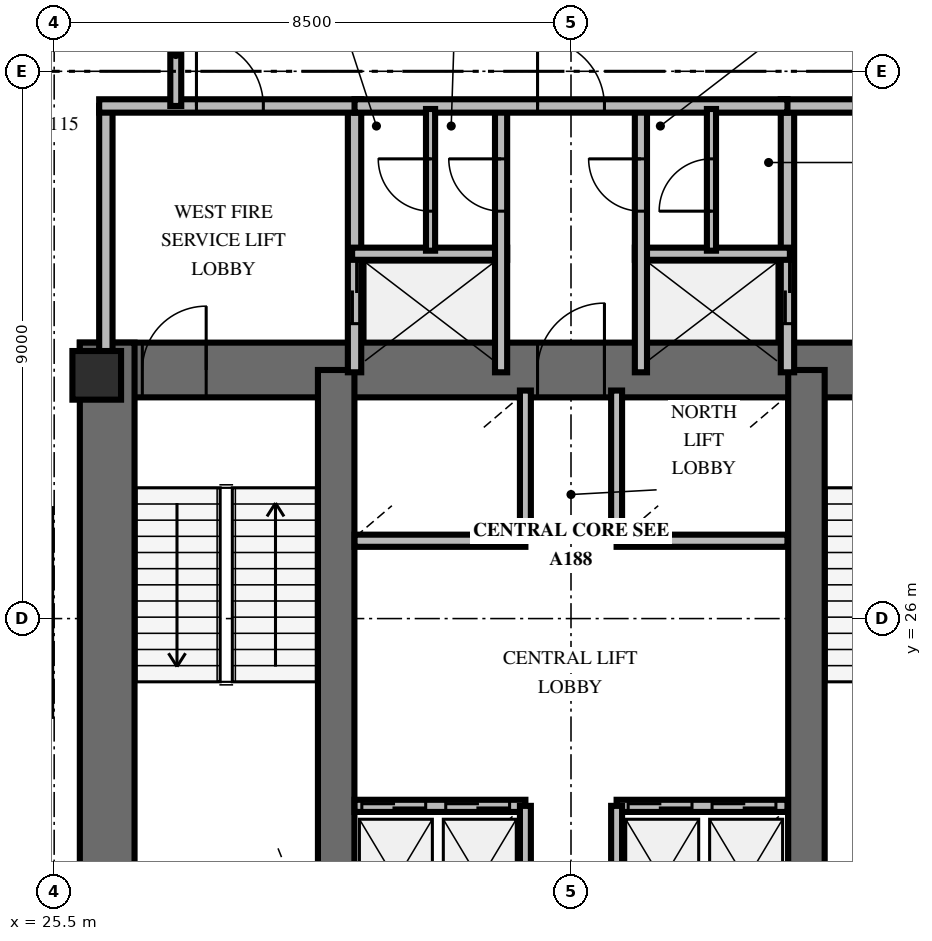
"""IFC4 building model, lengths in metres.
Left out: names, types, materials, properties, quantities, classifications, styles, units other than length and angle.
Written with IfcOpenShell. Run it as: python <this file> out.ifc"""

import sys

from ifc_helpers import new_model, si_unit, direction, frame, frame_2d, origin, origin_2d, place, context, subcontext, project, spatial, rectangle, extrude, element, fill, save


model = new_model("IFC4")
c1 = context("Model", 3, precision=1e-05, world=origin(), true_north=direction((0.0, 1.0)))
c2 = subcontext(c1, "Body", "Model", "MODEL_VIEW")
j1 = project(units=[si_unit("LENGTHUNIT", "METRE"), si_unit("PLANEANGLEUNIT", "RADIAN")], contexts=[c1])
p1 = place(None, origin())
s1 = spatial("IfcSite", under=j1, at=p1, CompositionType="ELEMENT")
p2 = place(p1, origin())
s2 = spatial("IfcBuilding", under=s1, at=p2, CompositionType="ELEMENT")
p3 = place(p2, frame((0.0, 0.0, 38.4)))
s3 = spatial("IfcBuildingStorey", under=s2, at=p3, CompositionType="ELEMENT", Elevation=38.4)
p4 = place(p3, frame((25.922, 30.088, 0.0), z_axis=(0.0, 0.0, 1.0), x_axis=(1.0, 0.0, 0.0)))
e1 = element("IfcWall", 1, at=p4, inside=s3, PredefinedType="SHEAR", context=c2, shape_type="SweptSolid", body=[
    extrude(rectangle(XDim=16.166, YDim=0.9, at=frame_2d((8.083, 0.0))), origin(), (0.0, 0.0, 1.0), 4.2),
])
p5 = place(p4, frame((1.028, 0.0, 0.0)))
e2 = element("IfcOpeningElement", 2, at=p5, cuts=e1, PredefinedType="OPENING", context=c2, shape_type="SweptSolid", body=[
    extrude(rectangle(XDim=1.05, YDim=2.15, at=frame_2d((0.525, 1.075))), frame((0.0, 0.46, 0.0), z_axis=(0.0, -1.0, 0.0), x_axis=(1.0, 0.0, 0.0)), (0.0, 0.0, 1.0), 0.92),
])
p6 = place(p4, frame((14.078, 0.0, 0.0)))
e3 = element("IfcOpeningElement", 3, at=p6, cuts=e1, PredefinedType="OPENING", context=c2, shape_type="SweptSolid", body=[
    extrude(rectangle(XDim=1.05, YDim=2.15, at=frame_2d((0.525, 1.075))), frame((0.0, 0.46, 0.0), z_axis=(0.0, -1.0, 0.0), x_axis=(1.0, 0.0, 0.0)), (0.0, 0.0, 1.0), 0.92),
])
p7 = place(p4, frame((7.528, 0.0, 0.0)))
e4 = element("IfcOpeningElement", 4, at=p7, cuts=e1, PredefinedType="OPENING", context=c2, shape_type="SweptSolid", body=[
    extrude(rectangle(XDim=1.1, YDim=2.15, at=frame_2d((0.55, 1.075))), frame((0.0, 0.46, 0.0), z_axis=(0.0, -1.0, 0.0), x_axis=(1.0, 0.0, 0.0)), (0.0, 0.0, 1.0), 0.92),
])
p8 = place(p3, frame((26.372, 19.662, 0.0), z_axis=(0.0, 0.0, 1.0), x_axis=(0.0, 1.0, 0.0)))
e5 = element("IfcWall", 5, at=p8, inside=s3, PredefinedType="SHEAR", context=c2, shape_type="SweptSolid", body=[
    extrude(rectangle(XDim=10.876, YDim=0.9, at=frame_2d((5.438, 0.0))), origin(), (0.0, 0.0, 1.0), 4.2),
])
for number, where, z_axis, x_axis in (
    (6, (30.138, 20.112, 0.0), (0.0, 0.0, 1.0), (0.0, 1.0, 0.0)),
    (7, (37.872, 20.112, 0.0), (0.0, 0.0, 1.0), (0.0, 1.0, 0.0)),
):
    element("IfcWall", number, at=place(p3, frame(where, z_axis=z_axis, x_axis=x_axis)), inside=s3, PredefinedType="SHEAR", context=c2, shape_type="SweptSolid", body=[
        extrude(rectangle(XDim=9.976, YDim=0.6, at=frame_2d((4.988, 0.0))), origin(), (0.0, 0.0, 1.0), 4.2),
    ])
p9 = place(p3, frame((26.2, 30.0, 0.0), z_axis=(0.0, 0.0, 1.0), x_axis=(1.0, 0.0, 0.0)))
e8 = element("IfcColumn", 8, at=p9, inside=s3, PredefinedType="PILASTER", context=c2, shape_type="SweptSolid", body=[
    extrude(rectangle(XDim=0.8, YDim=0.8, at=origin_2d()), origin(), (0.0, 0.0, 1.0), 4.2),
])
p10 = place(p3, frame((26.35, 30.05, 0.0), z_axis=(0.0, 0.0, 1.0), x_axis=(0.0, 1.0, 0.0)))
e9 = element("IfcWall", 9, at=p10, inside=s3, PredefinedType="SOLIDWALL", context=c2, shape_type="SweptSolid", body=[
    extrude(rectangle(XDim=4.38, YDim=0.22, at=frame_2d((2.19, 0.0))), origin(), (0.0, 0.0, 1.0), 3.0),
])
p11 = place(p3, frame((30.44, 30.05, 0.0), z_axis=(0.0, 0.0, 1.0), x_axis=(0.0, 1.0, 0.0)))
e10 = element("IfcWall", 10, at=p11, inside=s3, PredefinedType="SOLIDWALL", context=c2, shape_type="SweptSolid", body=[
    extrude(rectangle(XDim=4.38, YDim=0.22, at=frame_2d((2.19, 0.0))), origin(), (0.0, 0.0, 1.0), 3.0),
])
p12 = place(p11, frame((0.8, 0.0, 0.0)))
e11 = element("IfcOpeningElement", 11, at=p12, cuts=e10, PredefinedType="OPENING", context=c2, shape_type="SweptSolid", body=[
    extrude(rectangle(XDim=1.05, YDim=2.1, at=frame_2d((0.525, 1.05))), frame((0.0, 0.12, 0.0), z_axis=(0.0, -1.0, 0.0), x_axis=(1.0, 0.0, 0.0)), (0.0, 0.0, 1.0), 0.24),
])
p13 = place(p3, frame((26.24, 34.43, 0.0), z_axis=(0.0, 0.0, 1.0), x_axis=(1.0, 0.0, 0.0)))
e12 = element("IfcWall", 12, at=p13, inside=s3, PredefinedType="SOLIDWALL", context=c2, shape_type="SweptSolid", body=[
    extrude(rectangle(XDim=4.31, YDim=0.22, at=frame_2d((2.155, 0.0))), origin(), (0.0, 0.0, 1.0), 3.0),
])
p14 = place(p13, frame((1.6, 0.0, 0.0)))
e13 = element("IfcOpeningElement", 13, at=p14, cuts=e12, PredefinedType="OPENING", context=c2, shape_type="SweptSolid", body=[
    extrude(rectangle(XDim=1.1, YDim=2.15, at=frame_2d((0.55, 1.075))), frame((0.0, 0.12, 0.0), z_axis=(0.0, -1.0, 0.0), x_axis=(1.0, 0.0, 0.0)), (0.0, 0.0, 1.0), 0.24),
])
p15 = place(p3, frame((30.4, 32.0, 0.0), z_axis=(0.0, 0.0, 1.0), x_axis=(1.0, 0.0, 0.0)))
e14 = element("IfcWall", 14, at=p15, inside=s3, PredefinedType="SOLIDWALL", context=c2, shape_type="SweptSolid", body=[
    extrude(rectangle(XDim=2.55, YDim=0.2, at=frame_2d((1.275, 0.0))), origin(), (0.0, 0.0, 1.0), 3.0),
])
p16 = place(p3, frame((32.85, 30.05, 0.0), z_axis=(0.0, 0.0, 1.0), x_axis=(0.0, 1.0, 0.0)))
e15 = element("IfcWall", 15, at=p16, inside=s3, PredefinedType="SOLIDWALL", context=c2, shape_type="SweptSolid", body=[
    extrude(rectangle(XDim=4.38, YDim=0.2, at=frame_2d((2.19, 0.0))), origin(), (0.0, 0.0, 1.0), 3.0),
])
p17 = place(p16, frame((2.65, 0.0, 0.0)))
e16 = element("IfcOpeningElement", 16, at=p17, cuts=e15, PredefinedType="OPENING", context=c2, shape_type="SweptSolid", body=[
    extrude(rectangle(XDim=0.86, YDim=2.05, at=frame_2d((0.43, 1.025))), frame((0.0, 0.11, 0.0), z_axis=(0.0, -1.0, 0.0), x_axis=(1.0, 0.0, 0.0)), (0.0, 0.0, 1.0), 0.22),
])
p18 = place(p3, frame((37.56, 30.05, 0.0), z_axis=(0.0, 0.0, 1.0), x_axis=(0.0, 1.0, 0.0)))
e17 = element("IfcWall", 17, at=p18, inside=s3, PredefinedType="SOLIDWALL", context=c2, shape_type="SweptSolid", body=[
    extrude(rectangle(XDim=4.38, YDim=0.22, at=frame_2d((2.19, 0.0))), origin(), (0.0, 0.0, 1.0), 3.0),
])
p19 = place(p18, frame((0.8, 0.0, 0.0)))
e18 = element("IfcOpeningElement", 18, at=p19, cuts=e17, PredefinedType="OPENING", context=c2, shape_type="SweptSolid", body=[
    extrude(rectangle(XDim=1.05, YDim=2.1, at=frame_2d((0.525, 1.05))), frame((0.0, 0.12, 0.0), z_axis=(0.0, -1.0, 0.0), x_axis=(1.0, 0.0, 0.0)), (0.0, 0.0, 1.0), 0.24),
])
p20 = place(p3, frame((37.45, 34.43, 0.0), z_axis=(0.0, 0.0, 1.0), x_axis=(1.0, 0.0, 0.0)))
e19 = element("IfcWall", 19, at=p20, inside=s3, PredefinedType="SOLIDWALL", context=c2, shape_type="SweptSolid", body=[
    extrude(rectangle(XDim=4.31, YDim=0.22, at=frame_2d((2.155, 0.0))), origin(), (0.0, 0.0, 1.0), 3.0),
])
p21 = place(p20, frame((1.6, 0.0, 0.0)))
e20 = element("IfcOpeningElement", 20, at=p21, cuts=e19, PredefinedType="OPENING", context=c2, shape_type="SweptSolid", body=[
    extrude(rectangle(XDim=1.1, YDim=2.15, at=frame_2d((0.55, 1.075))), frame((0.0, 0.12, 0.0), z_axis=(0.0, -1.0, 0.0), x_axis=(1.0, 0.0, 0.0)), (0.0, 0.0, 1.0), 0.24),
])
p22 = place(p3, frame((35.05, 32.0, 0.0), z_axis=(0.0, 0.0, 1.0), x_axis=(1.0, 0.0, 0.0)))
e21 = element("IfcWall", 21, at=p22, inside=s3, PredefinedType="SOLIDWALL", context=c2, shape_type="SweptSolid", body=[
    extrude(rectangle(XDim=2.55, YDim=0.2, at=frame_2d((1.275, 0.0))), origin(), (0.0, 0.0, 1.0), 3.0),
])
p23 = place(p3, frame((35.15, 30.05, 0.0), z_axis=(0.0, 0.0, 1.0), x_axis=(0.0, 1.0, 0.0)))
e22 = element("IfcWall", 22, at=p23, inside=s3, PredefinedType="SOLIDWALL", context=c2, shape_type="SweptSolid", body=[
    extrude(rectangle(XDim=4.38, YDim=0.2, at=frame_2d((2.19, 0.0))), origin(), (0.0, 0.0, 1.0), 3.0),
])
p24 = place(p23, frame((2.65, 0.0, 0.0)))
e23 = element("IfcOpeningElement", 23, at=p24, cuts=e22, PredefinedType="OPENING", context=c2, shape_type="SweptSolid", body=[
    extrude(rectangle(XDim=0.86, YDim=2.05, at=frame_2d((0.43, 1.025))), frame((0.0, 0.11, 0.0), z_axis=(0.0, -1.0, 0.0), x_axis=(1.0, 0.0, 0.0)), (0.0, 0.0, 1.0), 0.22),
])
p25 = place(p3, frame((30.44, 34.43, 0.0), z_axis=(0.0, 0.0, 1.0), x_axis=(1.0, 0.0, 0.0)))
e24 = element("IfcWall", 24, at=p25, inside=s3, PredefinedType="SOLIDWALL", context=c2, shape_type="SweptSolid", body=[
    extrude(rectangle(XDim=7.12, YDim=0.22, at=frame_2d((3.56, 0.0))), origin(), (0.0, 0.0, 1.0), 3.0),
])
p26 = place(p25, frame((3.01, 0.0, 0.0)))
e25 = element("IfcOpeningElement", 25, at=p26, cuts=e24, PredefinedType="OPENING", context=c2, shape_type="SweptSolid", body=[
    extrude(rectangle(XDim=1.1, YDim=2.15, at=frame_2d((0.55, 1.075))), frame((0.0, 0.12, 0.0), z_axis=(0.0, -1.0, 0.0), x_axis=(1.0, 0.0, 0.0)), (0.0, 0.0, 1.0), 0.24),
])
p27 = place(p3, frame((31.69, 32.05, 0.0), z_axis=(0.0, 0.0, 1.0), x_axis=(0.0, 1.0, 0.0)))
e26 = element("IfcWall", 26, at=p27, inside=s3, PredefinedType="PARTITIONING", context=c2, shape_type="SweptSolid", body=[
    extrude(rectangle(XDim=2.33, YDim=0.15, at=frame_2d((1.165, 0.0))), origin(), (0.0, 0.0, 1.0), 3.0),
])
p28 = place(p27, frame((0.65, 0.0, 0.0)))
e27 = element("IfcOpeningElement", 27, at=p28, cuts=e26, PredefinedType="OPENING", context=c2, shape_type="SweptSolid", body=[
    extrude(rectangle(XDim=0.86, YDim=2.05, at=frame_2d((0.43, 1.025))), frame((0.0, 0.085, 0.0), z_axis=(0.0, -1.0, 0.0), x_axis=(1.0, 0.0, 0.0)), (0.0, 0.0, 1.0), 0.17),
])
p29 = place(p3, frame((36.31, 32.05, 0.0), z_axis=(0.0, 0.0, 1.0), x_axis=(0.0, 1.0, 0.0)))
e28 = element("IfcWall", 28, at=p29, inside=s3, PredefinedType="PARTITIONING", context=c2, shape_type="SweptSolid", body=[
    extrude(rectangle(XDim=2.33, YDim=0.15, at=frame_2d((1.165, 0.0))), origin(), (0.0, 0.0, 1.0), 3.0),
])
p30 = place(p29, frame((0.65, 0.0, 0.0)))
e29 = element("IfcOpeningElement", 29, at=p30, cuts=e28, PredefinedType="OPENING", context=c2, shape_type="SweptSolid", body=[
    extrude(rectangle(XDim=0.86, YDim=2.05, at=frame_2d((0.43, 1.025))), frame((0.0, 0.085, 0.0), z_axis=(0.0, -1.0, 0.0), x_axis=(1.0, 0.0, 0.0)), (0.0, 0.0, 1.0), 0.17),
])
p31 = place(p3, frame((30.44, 22.92, 0.0), z_axis=(0.0, 0.0, 1.0), x_axis=(1.0, 0.0, 0.0)))
e30 = element("IfcWall", 30, at=p31, inside=s3, PredefinedType="SOLIDWALL", context=c2, shape_type="SweptSolid", body=[
    extrude(rectangle(XDim=2.81, YDim=0.2, at=frame_2d((1.405, 0.0))), origin(), (0.0, 0.0, 1.0), 3.0),
])
p32 = place(p31, frame((0.12, 0.0, 0.0)))
e31 = element("IfcOpeningElement", 31, at=p32, cuts=e30, PredefinedType="OPENING", context=c2, shape_type="SweptSolid", body=[
    extrude(rectangle(XDim=1.05, YDim=2.1, at=frame_2d((0.525, 1.05))), frame((0.0, 0.11, 0.0), z_axis=(0.0, -1.0, 0.0), x_axis=(1.0, 0.0, 0.0)), (0.0, 0.0, 1.0), 0.22),
])
p33 = place(p31, frame((1.5, 0.0, 0.0)))
e32 = element("IfcOpeningElement", 32, at=p33, cuts=e30, PredefinedType="OPENING", context=c2, shape_type="SweptSolid", body=[
    extrude(rectangle(XDim=1.05, YDim=2.1, at=frame_2d((0.525, 1.05))), frame((0.0, 0.11, 0.0), z_axis=(0.0, -1.0, 0.0), x_axis=(1.0, 0.0, 0.0)), (0.0, 0.0, 1.0), 0.22),
])
p34 = place(p3, frame((33.25, 20.5, 0.0), z_axis=(0.0, 0.0, 1.0), x_axis=(0.0, 1.0, 0.0)))
e33 = element("IfcWall", 33, at=p34, inside=s3, PredefinedType="SOLIDWALL", context=c2, shape_type="SweptSolid", body=[
    extrude(rectangle(XDim=2.42, YDim=0.18, at=frame_2d((1.21, 0.0))), origin(), (0.0, 0.0, 1.0), 3.0),
])
p35 = place(p3, frame((34.75, 22.92, 0.0), z_axis=(0.0, 0.0, 1.0), x_axis=(1.0, 0.0, 0.0)))
e34 = element("IfcWall", 34, at=p35, inside=s3, PredefinedType="SOLIDWALL", context=c2, shape_type="SweptSolid", body=[
    extrude(rectangle(XDim=2.81, YDim=0.2, at=frame_2d((1.405, 0.0))), origin(), (0.0, 0.0, 1.0), 3.0),
])
p36 = place(p35, frame((0.19, 0.0, 0.0)))
e35 = element("IfcOpeningElement", 35, at=p36, cuts=e34, PredefinedType="OPENING", context=c2, shape_type="SweptSolid", body=[
    extrude(rectangle(XDim=1.05, YDim=2.1, at=frame_2d((0.525, 1.05))), frame((0.0, 0.11, 0.0), z_axis=(0.0, -1.0, 0.0), x_axis=(1.0, 0.0, 0.0)), (0.0, 0.0, 1.0), 0.22),
])
p37 = place(p35, frame((1.57, 0.0, 0.0)))
e36 = element("IfcOpeningElement", 36, at=p37, cuts=e34, PredefinedType="OPENING", context=c2, shape_type="SweptSolid", body=[
    extrude(rectangle(XDim=1.05, YDim=2.1, at=frame_2d((0.525, 1.05))), frame((0.0, 0.11, 0.0), z_axis=(0.0, -1.0, 0.0), x_axis=(1.0, 0.0, 0.0)), (0.0, 0.0, 1.0), 0.22),
])
p38 = place(p3, frame((34.75, 20.5, 0.0), z_axis=(0.0, 0.0, 1.0), x_axis=(0.0, 1.0, 0.0)))
e37 = element("IfcWall", 37, at=p38, inside=s3, PredefinedType="SOLIDWALL", context=c2, shape_type="SweptSolid", body=[
    extrude(rectangle(XDim=2.42, YDim=0.18, at=frame_2d((1.21, 0.0))), origin(), (0.0, 0.0, 1.0), 3.0),
])
p39 = place(p3, frame((30.44, 27.28, 0.0), z_axis=(0.0, 0.0, 1.0), x_axis=(1.0, 0.0, 0.0)))
e38 = element("IfcWall", 38, at=p39, inside=s3, PredefinedType="SOLIDWALL", context=c2, shape_type="SweptSolid", body=[
    extrude(rectangle(XDim=2.81, YDim=0.2, at=frame_2d((1.405, 0.0))), origin(), (0.0, 0.0, 1.0), 3.0),
])
p40 = place(p3, frame((33.25, 27.28, 0.0), z_axis=(0.0, 0.0, 1.0), x_axis=(0.0, 1.0, 0.0)))
e39 = element("IfcWall", 39, at=p40, inside=s3, PredefinedType="SOLIDWALL", context=c2, shape_type="SweptSolid", body=[
    extrude(rectangle(XDim=2.47, YDim=0.18, at=frame_2d((1.235, 0.0))), origin(), (0.0, 0.0, 1.0), 3.0),
])
p41 = place(p3, frame((34.75, 27.28, 0.0), z_axis=(0.0, 0.0, 1.0), x_axis=(1.0, 0.0, 0.0)))
e40 = element("IfcWall", 40, at=p41, inside=s3, PredefinedType="SOLIDWALL", context=c2, shape_type="SweptSolid", body=[
    extrude(rectangle(XDim=2.81, YDim=0.2, at=frame_2d((1.405, 0.0))), origin(), (0.0, 0.0, 1.0), 3.0),
])
p42 = place(p3, frame((34.75, 27.28, 0.0), z_axis=(0.0, 0.0, 1.0), x_axis=(0.0, 1.0, 0.0)))
e41 = element("IfcWall", 41, at=p42, inside=s3, PredefinedType="SOLIDWALL", context=c2, shape_type="SweptSolid", body=[
    extrude(rectangle(XDim=2.47, YDim=0.18, at=frame_2d((1.235, 0.0))), origin(), (0.0, 0.0, 1.0), 3.0),
])
p43 = place(p3, frame((27.5, 34.43, 0.0), z_axis=(0.0, 0.0, 1.0), x_axis=(0.0, 1.0, 0.0)))
e42 = element("IfcWall", 42, at=p43, inside=s3, PredefinedType="PARTITIONING", context=c2, shape_type="SweptSolid", body=[
    extrude(rectangle(XDim=1.693, YDim=0.18, at=frame_2d((0.846, 0.0))), origin(), (0.0, 0.0, 1.0), 3.0),
])
p44 = place(p3, frame((26.644, 37.818, 0.0), z_axis=(0.0, 0.0, 1.0), x_axis=(-0.744302787757, -0.667842316821, 0.0)))
e43 = element("IfcWall", 43, at=p44, inside=s3, PredefinedType="PARTITIONING", context=c2, shape_type="SweptSolid", body=[
    extrude(rectangle(XDim=4.834, YDim=0.18, at=frame_2d((2.417, 0.0))), origin(), (0.0, 0.0, 1.0), 3.0),
])
p45 = place(p44, frame((2.688, 0.0, 0.0)))
e44 = element("IfcOpeningElement", 44, at=p45, cuts=e43, PredefinedType="OPENING", context=c2, shape_type="SweptSolid", body=[
    extrude(rectangle(XDim=1.15, YDim=2.15, at=frame_2d((0.575, 1.075))), frame((0.0, 0.1, 0.0), z_axis=(0.0, -1.0, 0.0), x_axis=(1.0, 0.0, 0.0)), (0.0, 0.0, 1.0), 0.2),
])
p46 = place(p5, origin())
e45 = element("IfcDoor", 45, at=p46, inside=s3, OperationType="SINGLE_SWING_RIGHT", PredefinedType="DOOR", context=c2, shape_type="SweptSolid", body=[
    extrude(rectangle(XDim=1.05, YDim=2.15, at=frame_2d((0.525, 1.075))), frame((0.0, 0.025, 0.0), z_axis=(0.0, -1.0, 0.0), x_axis=(1.0, 0.0, 0.0)), (0.0, 0.0, 1.0), 0.05),
])
fill(e2, e45)
p47 = place(p7, origin())
e46 = element("IfcDoor", 46, at=p47, inside=s3, OperationType="SINGLE_SWING_RIGHT", PredefinedType="DOOR", context=c2, shape_type="SweptSolid", body=[
    extrude(rectangle(XDim=1.1, YDim=2.15, at=frame_2d((0.55, 1.075))), frame((0.0, 0.025, 0.0), z_axis=(0.0, -1.0, 0.0), x_axis=(1.0, 0.0, 0.0)), (0.0, 0.0, 1.0), 0.05),
])
fill(e4, e46)
p48 = place(p14, origin())
e47 = element("IfcDoor", 47, at=p48, inside=s3, OperationType="SINGLE_SWING_LEFT", PredefinedType="DOOR", context=c2, shape_type="SweptSolid", body=[
    extrude(rectangle(XDim=1.1, YDim=2.15, at=frame_2d((0.55, 1.075))), frame((0.0, 0.025, 0.0), z_axis=(0.0, -1.0, 0.0), x_axis=(1.0, 0.0, 0.0)), (0.0, 0.0, 1.0), 0.05),
])
fill(e13, e47)
p49 = place(p12, origin())
e48 = element("IfcDoor", 48, at=p49, inside=s3, OperationType="DOUBLE_DOOR_SLIDING", PredefinedType="USERDEFINED", context=c2, shape_type="SweptSolid", body=[
    extrude(rectangle(XDim=1.05, YDim=2.1, at=frame_2d((0.525, 1.05))), frame((0.0, 0.025, 0.0), z_axis=(0.0, -1.0, 0.0), x_axis=(1.0, 0.0, 0.0)), (0.0, 0.0, 1.0), 0.05),
])
fill(e11, e48)
p50 = place(p17, origin())
e49 = element("IfcDoor", 49, at=p50, inside=s3, OperationType="SINGLE_SWING_RIGHT", PredefinedType="TRAPDOOR", context=c2, shape_type="SweptSolid", body=[
    extrude(rectangle(XDim=0.86, YDim=2.05, at=frame_2d((0.43, 1.025))), frame((0.0, 0.025, 0.0), z_axis=(0.0, -1.0, 0.0), x_axis=(1.0, 0.0, 0.0)), (0.0, 0.0, 1.0), 0.05),
])
fill(e16, e49)
p51 = place(p19, origin())
e50 = element("IfcDoor", 50, at=p51, inside=s3, OperationType="DOUBLE_DOOR_SLIDING", PredefinedType="USERDEFINED", context=c2, shape_type="SweptSolid", body=[
    extrude(rectangle(XDim=1.05, YDim=2.1, at=frame_2d((0.525, 1.05))), frame((0.0, 0.025, 0.0), z_axis=(0.0, -1.0, 0.0), x_axis=(1.0, 0.0, 0.0)), (0.0, 0.0, 1.0), 0.05),
])
fill(e18, e50)
p52 = place(p24, origin())
e51 = element("IfcDoor", 51, at=p52, inside=s3, OperationType="SINGLE_SWING_RIGHT", PredefinedType="TRAPDOOR", context=c2, shape_type="SweptSolid", body=[
    extrude(rectangle(XDim=0.86, YDim=2.05, at=frame_2d((0.43, 1.025))), frame((0.0, 0.025, 0.0), z_axis=(0.0, -1.0, 0.0), x_axis=(1.0, 0.0, 0.0)), (0.0, 0.0, 1.0), 0.05),
])
fill(e23, e51)
p53 = place(p26, origin())
e52 = element("IfcDoor", 52, at=p53, inside=s3, OperationType="SINGLE_SWING_LEFT", PredefinedType="DOOR", context=c2, shape_type="SweptSolid", body=[
    extrude(rectangle(XDim=1.1, YDim=2.15, at=frame_2d((0.55, 1.075))), frame((0.0, 0.025, 0.0), z_axis=(0.0, -1.0, 0.0), x_axis=(1.0, 0.0, 0.0)), (0.0, 0.0, 1.0), 0.05),
])
fill(e25, e52)
p54 = place(p28, origin())
e53 = element("IfcDoor", 53, at=p54, inside=s3, OperationType="SINGLE_SWING_RIGHT", PredefinedType="TRAPDOOR", context=c2, shape_type="SweptSolid", body=[
    extrude(rectangle(XDim=0.86, YDim=2.05, at=frame_2d((0.43, 1.025))), frame((0.0, 0.025, 0.0), z_axis=(0.0, -1.0, 0.0), x_axis=(1.0, 0.0, 0.0)), (0.0, 0.0, 1.0), 0.05),
])
fill(e27, e53)
p55 = place(p30, origin())
e54 = element("IfcDoor", 54, at=p55, inside=s3, OperationType="SINGLE_SWING_LEFT", PredefinedType="TRAPDOOR", context=c2, shape_type="SweptSolid", body=[
    extrude(rectangle(XDim=0.86, YDim=2.05, at=frame_2d((0.43, 1.025))), frame((0.0, 0.025, 0.0), z_axis=(0.0, -1.0, 0.0), x_axis=(1.0, 0.0, 0.0)), (0.0, 0.0, 1.0), 0.05),
])
fill(e29, e54)
p56 = place(p32, origin())
e55 = element("IfcDoor", 55, at=p56, inside=s3, OperationType="DOUBLE_DOOR_SLIDING", PredefinedType="USERDEFINED", context=c2, shape_type="SweptSolid", body=[
    extrude(rectangle(XDim=1.05, YDim=2.1, at=frame_2d((0.525, 1.05))), frame((0.0, 0.025, 0.0), z_axis=(0.0, -1.0, 0.0), x_axis=(1.0, 0.0, 0.0)), (0.0, 0.0, 1.0), 0.05),
])
fill(e31, e55)
p57 = place(p33, origin())
e56 = element("IfcDoor", 56, at=p57, inside=s3, OperationType="DOUBLE_DOOR_SLIDING", PredefinedType="USERDEFINED", context=c2, shape_type="SweptSolid", body=[
    extrude(rectangle(XDim=1.05, YDim=2.1, at=frame_2d((0.525, 1.05))), frame((0.0, 0.025, 0.0), z_axis=(0.0, -1.0, 0.0), x_axis=(1.0, 0.0, 0.0)), (0.0, 0.0, 1.0), 0.05),
])
fill(e32, e56)
p58 = place(p36, origin())
e57 = element("IfcDoor", 57, at=p58, inside=s3, OperationType="DOUBLE_DOOR_SLIDING", PredefinedType="USERDEFINED", context=c2, shape_type="SweptSolid", body=[
    extrude(rectangle(XDim=1.05, YDim=2.1, at=frame_2d((0.525, 1.05))), frame((0.0, 0.025, 0.0), z_axis=(0.0, -1.0, 0.0), x_axis=(1.0, 0.0, 0.0)), (0.0, 0.0, 1.0), 0.05),
])
fill(e35, e57)
p59 = place(p37, origin())
e58 = element("IfcDoor", 58, at=p59, inside=s3, OperationType="DOUBLE_DOOR_SLIDING", PredefinedType="USERDEFINED", context=c2, shape_type="SweptSolid", body=[
    extrude(rectangle(XDim=1.05, YDim=2.1, at=frame_2d((0.525, 1.05))), frame((0.0, 0.025, 0.0), z_axis=(0.0, -1.0, 0.0), x_axis=(1.0, 0.0, 0.0)), (0.0, 0.0, 1.0), 0.05),
])
fill(e36, e58)
save(model, sys.argv[1])
